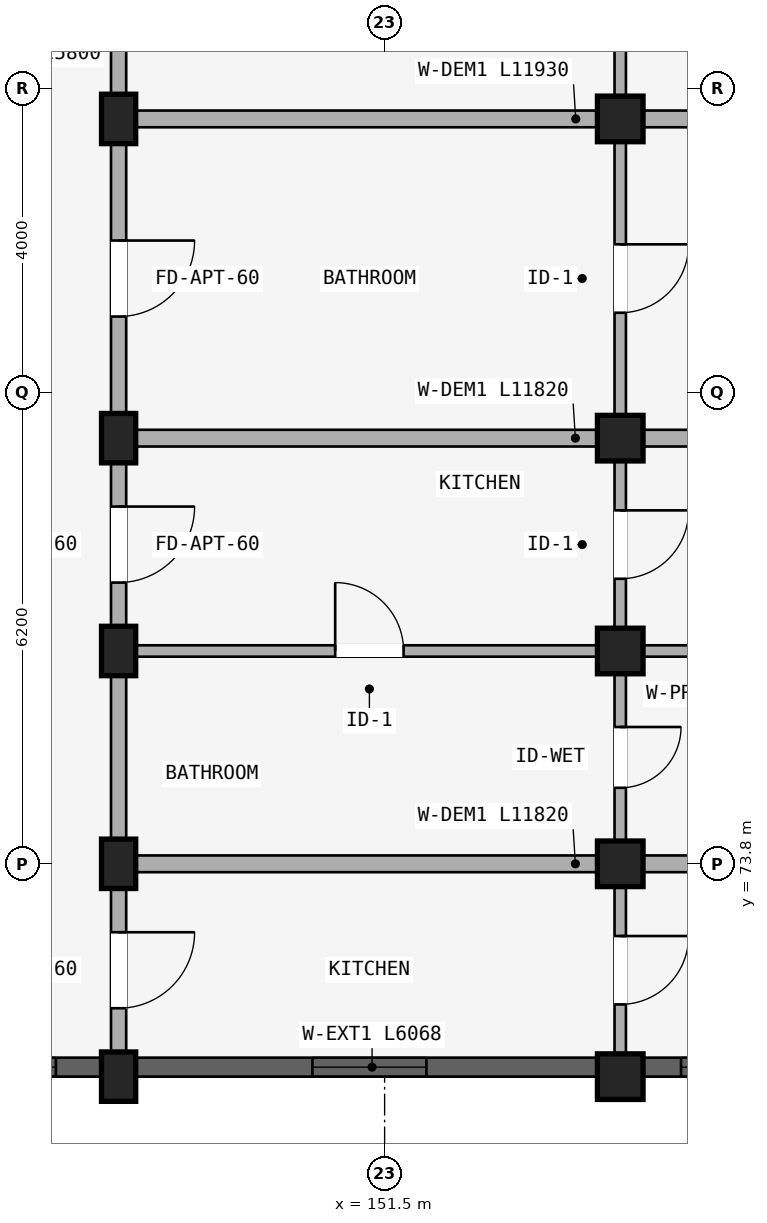
"""IFC4 building model, lengths in metres.
Left out: names, types, materials, properties, quantities, classifications, styles, units other than length and angle.
Written with IfcOpenShell. Run it as: python <this file> out.ifc"""

import sys

from ifc_helpers import new_model, si_unit, direction, frame, frame_2d, origin, origin_2d, place, context, subcontext, project, spatial, rectangle, extrude, element, fill, save


model = new_model("IFC4")
c1 = context("Model", 3, precision=1e-05, world=origin(), true_north=direction((0.0, 1.0)))
c2 = subcontext(c1, "Body", "Model", "MODEL_VIEW")
j1 = project(units=[si_unit("LENGTHUNIT", "METRE"), si_unit("PLANEANGLEUNIT", "RADIAN")], contexts=[c1])
p1 = place(None, origin())
s1 = spatial("IfcSite", under=j1, at=p1, CompositionType="ELEMENT")
p2 = place(p1, origin())
s2 = spatial("IfcBuilding", under=s1, at=p2, CompositionType="ELEMENT")
p3 = place(p2, frame((0.0, 0.0, 33.9)))
s3 = spatial("IfcBuildingStorey", under=s2, at=p3, CompositionType="ELEMENT", Elevation=33.9)
p4 = place(p3, frame((148.0, 83.6, 0.0), z_axis=(0.0, 0.0, 1.0), x_axis=(1.0, 0.0, 0.0)))
e1 = element("IfcColumn", 1, at=p4, inside=s3, PredefinedType="COLUMN", context=c2, shape_type="SweptSolid", body=[
    extrude(rectangle(XDim=0.45, YDim=0.65, at=origin_2d()), origin(), (0.0, 0.0, 1.0), 2.93),
])
p5 = place(p3, frame((154.6, 83.6, 0.0), z_axis=(0.0, 0.0, 1.0), x_axis=(1.0, 0.0, 0.0)))
e2 = element("IfcColumn", 2, at=p5, inside=s3, PredefinedType="COLUMN", context=c2, shape_type="SweptSolid", body=[
    extrude(rectangle(XDim=0.6, YDim=0.6, at=origin_2d()), origin(), (0.0, 0.0, 1.0), 2.93),
])
p6 = place(p3, frame((148.0, 79.4, 0.0), z_axis=(0.0, 0.0, 1.0), x_axis=(1.0, 0.0, 0.0)))
e3 = element("IfcColumn", 3, at=p6, inside=s3, PredefinedType="COLUMN", context=c2, shape_type="SweptSolid", body=[
    extrude(rectangle(XDim=0.45, YDim=0.65, at=origin_2d()), origin(), (0.0, 0.0, 1.0), 2.93),
])
p7 = place(p3, frame((154.6, 79.4, 0.0), z_axis=(0.0, 0.0, 1.0), x_axis=(1.0, 0.0, 0.0)))
e4 = element("IfcColumn", 4, at=p7, inside=s3, PredefinedType="COLUMN", context=c2, shape_type="SweptSolid", body=[
    extrude(rectangle(XDim=0.6, YDim=0.6, at=origin_2d()), origin(), (0.0, 0.0, 1.0), 2.93),
])
p8 = place(p3, frame((148.0, 76.6, 0.0), z_axis=(0.0, 0.0, 1.0), x_axis=(1.0, 0.0, 0.0)))
e5 = element("IfcColumn", 5, at=p8, inside=s3, PredefinedType="COLUMN", context=c2, shape_type="SweptSolid", body=[
    extrude(rectangle(XDim=0.45, YDim=0.65, at=origin_2d()), origin(), (0.0, 0.0, 1.0), 2.93),
])
p9 = place(p3, frame((154.6, 76.6, 0.0), z_axis=(0.0, 0.0, 1.0), x_axis=(1.0, 0.0, 0.0)))
e6 = element("IfcColumn", 6, at=p9, inside=s3, PredefinedType="COLUMN", context=c2, shape_type="SweptSolid", body=[
    extrude(rectangle(XDim=0.6, YDim=0.6, at=origin_2d()), origin(), (0.0, 0.0, 1.0), 2.93),
])
p10 = place(p3, frame((148.0, 73.8, 0.0), z_axis=(0.0, 0.0, 1.0), x_axis=(1.0, 0.0, 0.0)))
e7 = element("IfcColumn", 7, at=p10, inside=s3, PredefinedType="COLUMN", context=c2, shape_type="SweptSolid", body=[
    extrude(rectangle(XDim=0.45, YDim=0.65, at=origin_2d()), origin(), (0.0, 0.0, 1.0), 2.93),
])
p11 = place(p3, frame((154.6, 73.8, 0.0), z_axis=(0.0, 0.0, 1.0), x_axis=(1.0, 0.0, 0.0)))
e8 = element("IfcColumn", 8, at=p11, inside=s3, PredefinedType="COLUMN", context=c2, shape_type="SweptSolid", body=[
    extrude(rectangle(XDim=0.6, YDim=0.6, at=origin_2d()), origin(), (0.0, 0.0, 1.0), 2.93),
])
p12 = place(p3, frame((148.0, 71.0, 0.0), z_axis=(0.0, 0.0, 1.0), x_axis=(1.0, 0.0, 0.0)))
e9 = element("IfcColumn", 9, at=p12, inside=s3, PredefinedType="COLUMN", context=c2, shape_type="SweptSolid", body=[
    extrude(rectangle(XDim=0.45, YDim=0.65, at=origin_2d()), origin(), (0.0, 0.0, 1.0), 2.93),
])
p13 = place(p3, frame((154.6, 71.0, 0.0), z_axis=(0.0, 0.0, 1.0), x_axis=(1.0, 0.0, 0.0)))
e10 = element("IfcColumn", 10, at=p13, inside=s3, PredefinedType="COLUMN", context=c2, shape_type="SweptSolid", body=[
    extrude(rectangle(XDim=0.6, YDim=0.6, at=origin_2d()), origin(), (0.0, 0.0, 1.0), 2.93),
])
p14 = place(p3, frame((148.0, 87.65, 0.0), z_axis=(0.0, 0.0, 1.0), x_axis=(0.0, -1.0, 0.0)))
e11 = element("IfcWall", 11, at=p14, inside=s3, PredefinedType="STANDARD", context=c2, shape_type="SweptSolid", body=[
    extrude(rectangle(XDim=4.05, YDim=0.2, at=frame_2d((2.025, 0.0))), origin(), (0.0, 0.0, 1.0), 2.372),
])
p15 = place(p14, frame((1.525, 0.0, 0.0)))
e12 = element("IfcOpeningElement", 12, at=p15, cuts=e11, PredefinedType="OPENING", context=c2, shape_type="SweptSolid", body=[
    extrude(rectangle(XDim=1.0, YDim=2.15, at=frame_2d((0.5, 1.075))), frame((0.0, 0.11, 0.0), z_axis=(0.0, -1.0, 0.0), x_axis=(1.0, 0.0, 0.0)), (0.0, 0.0, 1.0), 0.22),
])
p16 = place(p3, frame((154.6, 87.57, 0.0), z_axis=(0.0, 0.0, 1.0), x_axis=(0.0, -1.0, 0.0)))
e13 = element("IfcWall", 13, at=p16, inside=s3, PredefinedType="PARTITIONING", context=c2, shape_type="SweptSolid", body=[
    extrude(rectangle(XDim=3.89, YDim=0.15, at=frame_2d((1.945, 0.0))), origin(), (0.0, 0.0, 1.0), 2.372),
])
p17 = place(p16, frame((1.495, 0.0, 0.0)))
e14 = element("IfcOpeningElement", 14, at=p17, cuts=e13, PredefinedType="OPENING", context=c2, shape_type="SweptSolid", body=[
    extrude(rectangle(XDim=0.9, YDim=2.1, at=frame_2d((0.45, 1.05))), frame((0.0, 0.085, 0.0), z_axis=(0.0, -1.0, 0.0), x_axis=(1.0, 0.0, 0.0)), (0.0, 0.0, 1.0), 0.17),
])
p18 = place(p3, frame((148.0, 83.6, 0.0), z_axis=(0.0, 0.0, 1.0), x_axis=(0.0, -1.0, 0.0)))
e15 = element("IfcWall", 15, at=p18, inside=s3, PredefinedType="STANDARD", context=c2, shape_type="SweptSolid", body=[
    extrude(rectangle(XDim=4.2, YDim=0.2, at=frame_2d((2.1, 0.0))), origin(), (0.0, 0.0, 1.0), 2.372),
])
p19 = place(p18, frame((1.6, 0.0, 0.0)))
e16 = element("IfcOpeningElement", 16, at=p19, cuts=e15, PredefinedType="OPENING", context=c2, shape_type="SweptSolid", body=[
    extrude(rectangle(XDim=1.0, YDim=2.15, at=frame_2d((0.5, 1.075))), frame((0.0, 0.11, 0.0), z_axis=(0.0, -1.0, 0.0), x_axis=(1.0, 0.0, 0.0)), (0.0, 0.0, 1.0), 0.22),
])
p20 = place(p3, frame((154.6, 83.52, 0.0), z_axis=(0.0, 0.0, 1.0), x_axis=(0.0, -1.0, 0.0)))
e17 = element("IfcWall", 17, at=p20, inside=s3, PredefinedType="PARTITIONING", context=c2, shape_type="SweptSolid", body=[
    extrude(rectangle(XDim=4.04, YDim=0.15, at=frame_2d((2.02, 0.0))), origin(), (0.0, 0.0, 1.0), 2.372),
])
p21 = place(p20, frame((1.57, 0.0, 0.0)))
e18 = element("IfcOpeningElement", 18, at=p21, cuts=e17, PredefinedType="OPENING", context=c2, shape_type="SweptSolid", body=[
    extrude(rectangle(XDim=0.9, YDim=2.1, at=frame_2d((0.45, 1.05))), frame((0.0, 0.085, 0.0), z_axis=(0.0, -1.0, 0.0), x_axis=(1.0, 0.0, 0.0)), (0.0, 0.0, 1.0), 0.17),
])
p22 = place(p3, frame((148.05, 83.6, 0.0), z_axis=(0.0, 0.0, 1.0), x_axis=(1.0, 0.0, 0.0)))
e19 = element("IfcWall", 19, at=p22, inside=s3, PredefinedType="STANDARD", context=c2, shape_type="SweptSolid", body=[
    extrude(rectangle(XDim=11.93, YDim=0.22, at=frame_2d((5.965, 0.0))), origin(), (0.0, 0.0, 1.0), 2.372),
])
p23 = place(p3, frame((148.0, 79.4, 0.0), z_axis=(0.0, 0.0, 1.0), x_axis=(0.0, -1.0, 0.0)))
e20 = element("IfcWall", 20, at=p23, inside=s3, PredefinedType="STANDARD", context=c2, shape_type="SweptSolid", body=[
    extrude(rectangle(XDim=2.8, YDim=0.2, at=frame_2d((1.4, 0.0))), origin(), (0.0, 0.0, 1.0), 2.372),
])
p24 = place(p23, frame((0.9, 0.0, 0.0)))
e21 = element("IfcOpeningElement", 21, at=p24, cuts=e20, PredefinedType="OPENING", context=c2, shape_type="SweptSolid", body=[
    extrude(rectangle(XDim=1.0, YDim=2.15, at=frame_2d((0.5, 1.075))), frame((0.0, 0.11, 0.0), z_axis=(0.0, -1.0, 0.0), x_axis=(1.0, 0.0, 0.0)), (0.0, 0.0, 1.0), 0.22),
])
p25 = place(p3, frame((154.6, 79.32, 0.0), z_axis=(0.0, 0.0, 1.0), x_axis=(0.0, -1.0, 0.0)))
e22 = element("IfcWall", 22, at=p25, inside=s3, PredefinedType="PLUMBINGWALL", context=c2, shape_type="SweptSolid", body=[
    extrude(rectangle(XDim=2.64, YDim=0.15, at=frame_2d((1.32, 0.0))), origin(), (0.0, 0.0, 1.0), 2.372),
])
p26 = place(p25, frame((0.87, 0.0, 0.0)))
e23 = element("IfcOpeningElement", 23, at=p26, cuts=e22, PredefinedType="OPENING", context=c2, shape_type="SweptSolid", body=[
    extrude(rectangle(XDim=0.9, YDim=2.1, at=frame_2d((0.45, 1.05))), frame((0.0, 0.085, 0.0), z_axis=(0.0, -1.0, 0.0), x_axis=(1.0, 0.0, 0.0)), (0.0, 0.0, 1.0), 0.17),
])
p27 = place(p3, frame((148.1, 79.4, 0.0), z_axis=(0.0, 0.0, 1.0), x_axis=(1.0, 0.0, 0.0)))
e24 = element("IfcWall", 24, at=p27, inside=s3, PredefinedType="STANDARD", context=c2, shape_type="SweptSolid", body=[
    extrude(rectangle(XDim=11.82, YDim=0.22, at=frame_2d((5.91, 0.0))), origin(), (0.0, 0.0, 1.0), 2.372),
])
p28 = place(p3, frame((148.0, 76.6, 0.0), z_axis=(0.0, 0.0, 1.0), x_axis=(0.0, -1.0, 0.0)))
e25 = element("IfcWall", 25, at=p28, inside=s3, PredefinedType="STANDARD", context=c2, shape_type="SweptSolid", body=[
    extrude(rectangle(XDim=2.8, YDim=0.2, at=frame_2d((1.4, 0.0))), origin(), (0.0, 0.0, 1.0), 2.372),
])
p29 = place(p3, frame((154.6, 76.52, 0.0), z_axis=(0.0, 0.0, 1.0), x_axis=(0.0, -1.0, 0.0)))
e26 = element("IfcWall", 26, at=p29, inside=s3, PredefinedType="PLUMBINGWALL", context=c2, shape_type="SweptSolid", body=[
    extrude(rectangle(XDim=2.64, YDim=0.15, at=frame_2d((1.32, 0.0))), origin(), (0.0, 0.0, 1.0), 2.372),
])
p30 = place(p29, frame((0.92, 0.0, 0.0)))
e27 = element("IfcOpeningElement", 27, at=p30, cuts=e26, PredefinedType="OPENING", context=c2, shape_type="SweptSolid", body=[
    extrude(rectangle(XDim=0.8, YDim=2.1, at=frame_2d((0.4, 1.05))), frame((0.0, 0.085, 0.0), z_axis=(0.0, -1.0, 0.0), x_axis=(1.0, 0.0, 0.0)), (0.0, 0.0, 1.0), 0.17),
])
p31 = place(p3, frame((148.1, 76.6, 0.0), z_axis=(0.0, 0.0, 1.0), x_axis=(1.0, 0.0, 0.0)))
e28 = element("IfcWall", 28, at=p31, inside=s3, PredefinedType="PARTITIONING", context=c2, shape_type="SweptSolid", body=[
    extrude(rectangle(XDim=11.82, YDim=0.15, at=frame_2d((5.91, 0.0))), origin(), (0.0, 0.0, 1.0), 2.372),
])
p32 = place(p31, frame((2.75, 0.0, 0.0)))
e29 = element("IfcOpeningElement", 29, at=p32, cuts=e28, PredefinedType="OPENING", context=c2, shape_type="SweptSolid", body=[
    extrude(rectangle(XDim=0.9, YDim=2.1, at=frame_2d((0.45, 1.05))), frame((0.0, 0.085, 0.0), z_axis=(0.0, -1.0, 0.0), x_axis=(1.0, 0.0, 0.0)), (0.0, 0.0, 1.0), 0.17),
])
p33 = place(p3, frame((148.0, 73.8, 0.0), z_axis=(0.0, 0.0, 1.0), x_axis=(0.0, -1.0, 0.0)))
e30 = element("IfcWall", 30, at=p33, inside=s3, PredefinedType="STANDARD", context=c2, shape_type="SweptSolid", body=[
    extrude(rectangle(XDim=2.8, YDim=0.2, at=frame_2d((1.4, 0.0))), origin(), (0.0, 0.0, 1.0), 2.372),
])
p34 = place(p33, frame((0.9, 0.0, 0.0)))
e31 = element("IfcOpeningElement", 31, at=p34, cuts=e30, PredefinedType="OPENING", context=c2, shape_type="SweptSolid", body=[
    extrude(rectangle(XDim=1.0, YDim=2.15, at=frame_2d((0.5, 1.075))), frame((0.0, 0.11, 0.0), z_axis=(0.0, -1.0, 0.0), x_axis=(1.0, 0.0, 0.0)), (0.0, 0.0, 1.0), 0.22),
])
p35 = place(p3, frame((154.6, 73.72, 0.0), z_axis=(0.0, 0.0, 1.0), x_axis=(0.0, -1.0, 0.0)))
e32 = element("IfcWall", 32, at=p35, inside=s3, PredefinedType="PLUMBINGWALL", context=c2, shape_type="SweptSolid", body=[
    extrude(rectangle(XDim=2.64, YDim=0.15, at=frame_2d((1.32, 0.0))), origin(), (0.0, 0.0, 1.0), 2.372),
])
p36 = place(p35, frame((0.87, 0.0, 0.0)))
e33 = element("IfcOpeningElement", 33, at=p36, cuts=e32, PredefinedType="OPENING", context=c2, shape_type="SweptSolid", body=[
    extrude(rectangle(XDim=0.9, YDim=2.1, at=frame_2d((0.45, 1.05))), frame((0.0, 0.085, 0.0), z_axis=(0.0, -1.0, 0.0), x_axis=(1.0, 0.0, 0.0)), (0.0, 0.0, 1.0), 0.17),
])
p37 = place(p3, frame((148.1, 73.8, 0.0), z_axis=(0.0, 0.0, 1.0), x_axis=(1.0, 0.0, 0.0)))
e34 = element("IfcWall", 34, at=p37, inside=s3, PredefinedType="STANDARD", context=c2, shape_type="SweptSolid", body=[
    extrude(rectangle(XDim=11.82, YDim=0.22, at=frame_2d((5.91, 0.0))), origin(), (0.0, 0.0, 1.0), 2.372),
])
p38 = place(p3, frame((145.829, 71.125, 0.0), z_axis=(0.0, 0.0, 1.0), x_axis=(1.0, 0.0, 0.0)))
e35 = element("IfcWall", 35, at=p38, inside=s3, PredefinedType="STANDARD", context=c2, shape_type="SweptSolid", body=[
    extrude(rectangle(XDim=1.943, YDim=0.25, at=frame_2d((0.971, 0.0))), origin(), (0.0, 0.0, 1.0), 2.372),
])
p39 = place(p38, frame((0.596, 0.0, 0.88)))
e36 = element("IfcOpeningElement", 36, at=p39, cuts=e35, PredefinedType="OPENING", context=c2, shape_type="SweptSolid", body=[
    extrude(rectangle(XDim=0.75, YDim=1.05, at=frame_2d((0.375, 0.525))), frame((0.0, 0.135, 0.0), z_axis=(0.0, -1.0, 0.0), x_axis=(1.0, 0.0, 0.0)), (0.0, 0.0, 1.0), 0.27),
])
p40 = place(p3, frame((148.229, 71.125, 0.0), z_axis=(0.0, 0.0, 1.0), x_axis=(1.0, 0.0, 0.0)))
e37 = element("IfcWall", 37, at=p40, inside=s3, PredefinedType="STANDARD", context=c2, shape_type="SweptSolid", body=[
    extrude(rectangle(XDim=6.068, YDim=0.25, at=frame_2d((3.034, 0.0))), origin(), (0.0, 0.0, 1.0), 2.372),
])
p41 = place(p40, frame((2.322, 0.0, 0.522)))
e38 = element("IfcOpeningElement", 38, at=p41, cuts=e37, PredefinedType="OPENING", context=c2, shape_type="SweptSolid", body=[
    extrude(rectangle(XDim=1.5, YDim=1.65, at=frame_2d((0.75, 0.825))), frame((0.0, 0.135, 0.0), z_axis=(0.0, -1.0, 0.0), x_axis=(1.0, 0.0, 0.0)), (0.0, 0.0, 1.0), 0.27),
])
p42 = place(p3, frame((154.904, 71.125, 0.0), z_axis=(0.0, 0.0, 1.0), x_axis=(1.0, 0.0, 0.0)))
e39 = element("IfcWall", 39, at=p42, inside=s3, PredefinedType="STANDARD", context=c2, shape_type="SweptSolid", body=[
    extrude(rectangle(XDim=2.193, YDim=0.25, at=frame_2d((1.096, 0.0))), origin(), (0.0, 0.0, 1.0), 2.372),
])
p43 = place(p42, frame((0.497, 0.0, 0.672)))
e40 = element("IfcOpeningElement", 40, at=p43, cuts=e39, PredefinedType="OPENING", context=c2, shape_type="SweptSolid", body=[
    extrude(rectangle(XDim=1.2, YDim=1.5, at=frame_2d((0.6, 0.75))), frame((0.0, 0.135, 0.0), z_axis=(0.0, -1.0, 0.0), x_axis=(1.0, 0.0, 0.0)), (0.0, 0.0, 1.0), 0.27),
])
p44 = place(p39, origin())
e41 = element("IfcWindow", 41, at=p44, inside=s3, PartitioningType="SINGLE_PANEL", PredefinedType="WINDOW", context=c2, shape_type="SweptSolid", body=[
    extrude(rectangle(XDim=0.75, YDim=1.05, at=frame_2d((0.375, 0.525))), frame((0.0, 0.03, 0.0), z_axis=(0.0, -1.0, 0.0), x_axis=(1.0, 0.0, 0.0)), (0.0, 0.0, 1.0), 0.06),
])
fill(e36, e41)
p45 = place(p41, origin())
e42 = element("IfcWindow", 42, at=p45, inside=s3, PartitioningType="DOUBLE_PANEL_VERTICAL", PredefinedType="WINDOW", context=c2, shape_type="SweptSolid", body=[
    extrude(rectangle(XDim=1.5, YDim=1.65, at=frame_2d((0.75, 0.825))), frame((0.0, 0.03, 0.0), z_axis=(0.0, -1.0, 0.0), x_axis=(1.0, 0.0, 0.0)), (0.0, 0.0, 1.0), 0.06),
])
fill(e38, e42)
p46 = place(p43, origin())
e43 = element("IfcWindow", 43, at=p46, inside=s3, PartitioningType="SINGLE_PANEL", PredefinedType="WINDOW", context=c2, shape_type="SweptSolid", body=[
    extrude(rectangle(XDim=1.2, YDim=1.5, at=frame_2d((0.6, 0.75))), frame((0.0, 0.03, 0.0), z_axis=(0.0, -1.0, 0.0), x_axis=(1.0, 0.0, 0.0)), (0.0, 0.0, 1.0), 0.06),
])
fill(e40, e43)
p47 = place(p19, frame((1.0, 0.0, 0.0), z_axis=(0.0, 0.0, 1.0), x_axis=(-1.0, 0.0, 0.0)))
e44 = element("IfcDoor", 44, at=p47, inside=s3, OperationType="SINGLE_SWING_RIGHT", PredefinedType="DOOR", context=c2, shape_type="SweptSolid", body=[
    extrude(rectangle(XDim=1.0, YDim=2.15, at=frame_2d((0.5, 1.075))), frame((0.0, 0.025, 0.0), z_axis=(0.0, -1.0, 0.0), x_axis=(1.0, 0.0, 0.0)), (0.0, 0.0, 1.0), 0.05),
])
fill(e16, e44)
p48 = place(p21, origin())
e45 = element("IfcDoor", 45, at=p48, inside=s3, OperationType="SINGLE_SWING_LEFT", PredefinedType="DOOR", context=c2, shape_type="SweptSolid", body=[
    extrude(rectangle(XDim=0.9, YDim=2.1, at=frame_2d((0.45, 1.05))), frame((0.0, 0.025, 0.0), z_axis=(0.0, -1.0, 0.0), x_axis=(1.0, 0.0, 0.0)), (0.0, 0.0, 1.0), 0.05),
])
fill(e18, e45)
p49 = place(p26, origin())
e46 = element("IfcDoor", 46, at=p49, inside=s3, OperationType="SINGLE_SWING_LEFT", PredefinedType="DOOR", context=c2, shape_type="SweptSolid", body=[
    extrude(rectangle(XDim=0.9, YDim=2.1, at=frame_2d((0.45, 1.05))), frame((0.0, 0.025, 0.0), z_axis=(0.0, -1.0, 0.0), x_axis=(1.0, 0.0, 0.0)), (0.0, 0.0, 1.0), 0.05),
])
fill(e23, e46)
p50 = place(p24, frame((1.0, 0.0, 0.0), z_axis=(0.0, 0.0, 1.0), x_axis=(-1.0, 0.0, 0.0)))
e47 = element("IfcDoor", 47, at=p50, inside=s3, OperationType="SINGLE_SWING_RIGHT", PredefinedType="DOOR", context=c2, shape_type="SweptSolid", body=[
    extrude(rectangle(XDim=1.0, YDim=2.15, at=frame_2d((0.5, 1.075))), frame((0.0, 0.025, 0.0), z_axis=(0.0, -1.0, 0.0), x_axis=(1.0, 0.0, 0.0)), (0.0, 0.0, 1.0), 0.05),
])
fill(e21, e47)
p51 = place(p30, origin())
e48 = element("IfcDoor", 48, at=p51, inside=s3, OperationType="SINGLE_SWING_LEFT", PredefinedType="DOOR", context=c2, shape_type="SweptSolid", body=[
    extrude(rectangle(XDim=0.8, YDim=2.1, at=frame_2d((0.4, 1.05))), frame((0.0, 0.025, 0.0), z_axis=(0.0, -1.0, 0.0), x_axis=(1.0, 0.0, 0.0)), (0.0, 0.0, 1.0), 0.05),
])
fill(e27, e48)
p52 = place(p32, origin())
e49 = element("IfcDoor", 49, at=p52, inside=s3, OperationType="SINGLE_SWING_LEFT", PredefinedType="DOOR", context=c2, shape_type="SweptSolid", body=[
    extrude(rectangle(XDim=0.9, YDim=2.1, at=frame_2d((0.45, 1.05))), frame((0.0, 0.025, 0.0), z_axis=(0.0, -1.0, 0.0), x_axis=(1.0, 0.0, 0.0)), (0.0, 0.0, 1.0), 0.05),
])
fill(e29, e49)
p53 = place(p36, origin())
e50 = element("IfcDoor", 50, at=p53, inside=s3, OperationType="SINGLE_SWING_LEFT", PredefinedType="DOOR", context=c2, shape_type="SweptSolid", body=[
    extrude(rectangle(XDim=0.9, YDim=2.1, at=frame_2d((0.45, 1.05))), frame((0.0, 0.025, 0.0), z_axis=(0.0, -1.0, 0.0), x_axis=(1.0, 0.0, 0.0)), (0.0, 0.0, 1.0), 0.05),
])
fill(e33, e50)
p54 = place(p34, frame((1.0, 0.0, 0.0), z_axis=(0.0, 0.0, 1.0), x_axis=(-1.0, 0.0, 0.0)))
e51 = element("IfcDoor", 51, at=p54, inside=s3, OperationType="SINGLE_SWING_RIGHT", PredefinedType="DOOR", context=c2, shape_type="SweptSolid", body=[
    extrude(rectangle(XDim=1.0, YDim=2.15, at=frame_2d((0.5, 1.075))), frame((0.0, 0.025, 0.0), z_axis=(0.0, -1.0, 0.0), x_axis=(1.0, 0.0, 0.0)), (0.0, 0.0, 1.0), 0.05),
])
fill(e31, e51)
save(model, sys.argv[1])
